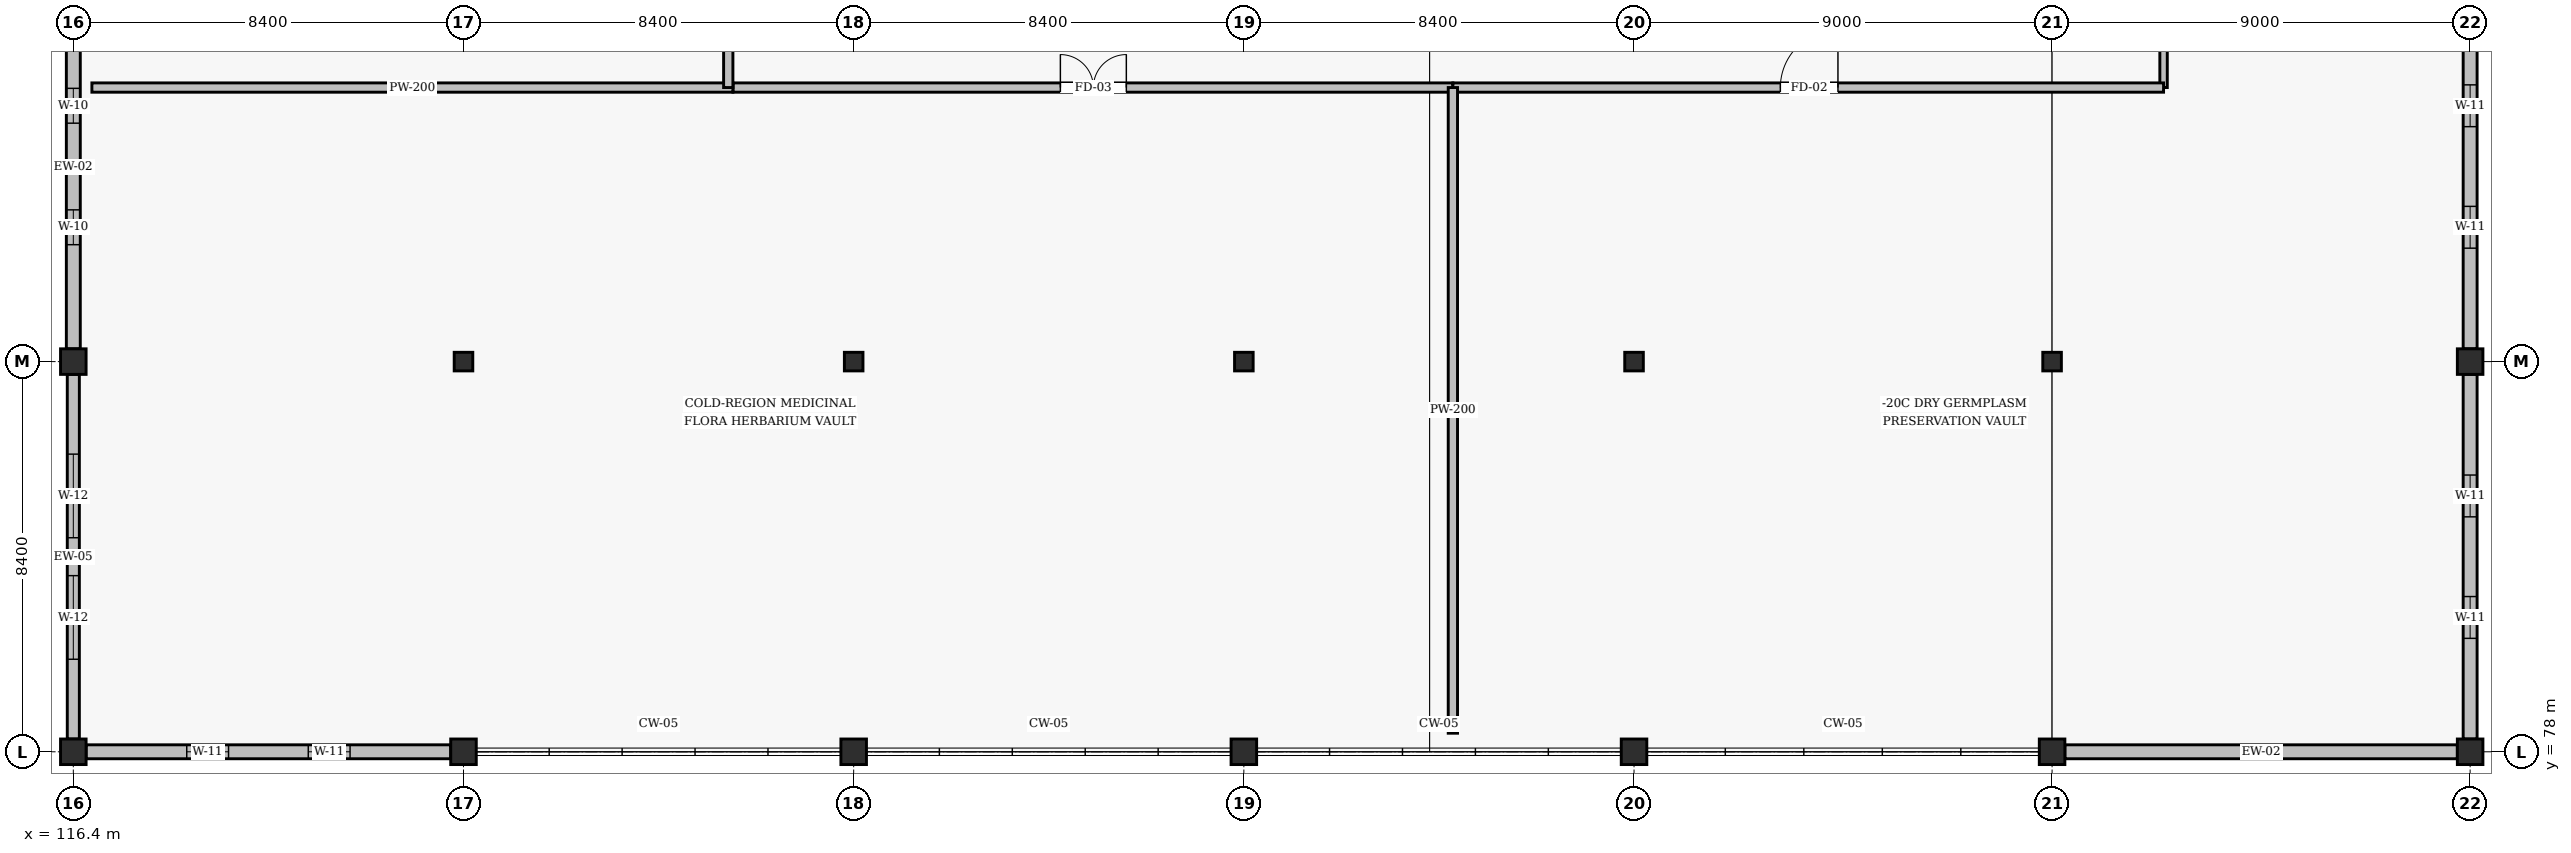
"""IFC4 building model, lengths in metres.
Left out: names, types, materials, properties, quantities, classifications, styles, units other than length and angle.
Written with IfcOpenShell. Run it as: python <this file> out.ifc"""

import sys

from ifc_helpers import new_model, si_unit, direction, frame, frame_2d, origin, origin_2d, place, context, subcontext, project, spatial, rectangle, hollow_rectangle, i_section, extrude, element, fill, save


model = new_model("IFC4")
c1 = context("Model", 3, precision=1e-05, world=origin(), true_north=direction((0.0, 1.0)))
c2 = subcontext(c1, "Body", "Model", "MODEL_VIEW")
j1 = project(units=[si_unit("LENGTHUNIT", "METRE"), si_unit("PLANEANGLEUNIT", "RADIAN")], contexts=[c1])
p1 = place(None, origin())
s1 = spatial("IfcSite", under=j1, at=p1, CompositionType="ELEMENT")
p2 = place(p1, origin())
s2 = spatial("IfcBuilding", under=s1, at=p2, CompositionType="ELEMENT")
p3 = place(p2, frame((0.0, 0.0, 17.1)))
s3 = spatial("IfcBuildingStorey", under=s2, at=p3, CompositionType="ELEMENT", Elevation=17.1)
for number, where, z_axis, x_axis in (
    (1, (116.4, 78.0, 0.0), (0.0, 0.0, 1.0), (1.0, 0.0, 0.0)),
    (2, (116.4, 86.4, 0.0), (0.0, 0.0, 1.0), (1.0, 0.0, 0.0)),
):
    element("IfcColumn", number, at=place(p3, frame(where, z_axis=z_axis, x_axis=x_axis)), inside=s3, PredefinedType="COLUMN", context=c2, shape_type="SweptSolid", body=[
        extrude(hollow_rectangle(XDim=0.55, YDim=0.55, WallThickness=0.022, InnerFilletRadius=0.022, OuterFilletRadius=0.044, at=origin_2d()), origin(), (0.0, 0.0, 1.0), 3.876),
    ])
p4 = place(p3, frame((124.8, 78.0, 0.0), z_axis=(0.0, 0.0, 1.0), x_axis=(1.0, 0.0, 0.0)))
e3 = element("IfcColumn", 3, at=p4, inside=s3, PredefinedType="COLUMN", context=c2, shape_type="SweptSolid", body=[
    extrude(hollow_rectangle(XDim=0.55, YDim=0.55, WallThickness=0.022, InnerFilletRadius=0.022, OuterFilletRadius=0.044, at=origin_2d()), origin(), (0.0, 0.0, 1.0), 3.9),
])
p5 = place(p3, frame((124.8, 86.4, 0.0), z_axis=(0.0, 0.0, 1.0), x_axis=(1.0, 0.0, 0.0)))
e4 = element("IfcColumn", 4, at=p5, inside=s3, PredefinedType="COLUMN", context=c2, shape_type="SweptSolid", body=[
    extrude(i_section(OverallWidth=0.4, OverallDepth=0.4, WebThickness=0.013, FlangeThickness=0.021, FilletRadius=0.022, at=origin_2d()), origin(), (0.0, 0.0, 1.0), 3.9),
])
p6 = place(p3, frame((133.2, 78.0, 0.0), z_axis=(0.0, 0.0, 1.0), x_axis=(1.0, 0.0, 0.0)))
e5 = element("IfcColumn", 5, at=p6, inside=s3, PredefinedType="COLUMN", context=c2, shape_type="SweptSolid", body=[
    extrude(hollow_rectangle(XDim=0.55, YDim=0.55, WallThickness=0.022, InnerFilletRadius=0.022, OuterFilletRadius=0.044, at=origin_2d()), origin(), (0.0, 0.0, 1.0), 3.9),
])
p7 = place(p3, frame((133.2, 86.4, 0.0), z_axis=(0.0, 0.0, 1.0), x_axis=(1.0, 0.0, 0.0)))
e6 = element("IfcColumn", 6, at=p7, inside=s3, PredefinedType="COLUMN", context=c2, shape_type="SweptSolid", body=[
    extrude(i_section(OverallWidth=0.4, OverallDepth=0.4, WebThickness=0.013, FlangeThickness=0.021, FilletRadius=0.022, at=origin_2d()), origin(), (0.0, 0.0, 1.0), 3.9),
])
p8 = place(p3, frame((141.6, 78.0, 0.0), z_axis=(0.0, 0.0, 1.0), x_axis=(1.0, 0.0, 0.0)))
e7 = element("IfcColumn", 7, at=p8, inside=s3, PredefinedType="COLUMN", context=c2, shape_type="SweptSolid", body=[
    extrude(hollow_rectangle(XDim=0.55, YDim=0.55, WallThickness=0.022, InnerFilletRadius=0.022, OuterFilletRadius=0.044, at=origin_2d()), origin(), (0.0, 0.0, 1.0), 3.9),
])
p9 = place(p3, frame((141.6, 86.4, 0.0), z_axis=(0.0, 0.0, 1.0), x_axis=(1.0, 0.0, 0.0)))
e8 = element("IfcColumn", 8, at=p9, inside=s3, PredefinedType="COLUMN", context=c2, shape_type="SweptSolid", body=[
    extrude(i_section(OverallWidth=0.4, OverallDepth=0.4, WebThickness=0.013, FlangeThickness=0.021, FilletRadius=0.022, at=origin_2d()), origin(), (0.0, 0.0, 1.0), 3.9),
])
p10 = place(p3, frame((150.0, 78.0, 0.0), z_axis=(0.0, 0.0, 1.0), x_axis=(1.0, 0.0, 0.0)))
e9 = element("IfcColumn", 9, at=p10, inside=s3, PredefinedType="COLUMN", context=c2, shape_type="SweptSolid", body=[
    extrude(hollow_rectangle(XDim=0.55, YDim=0.55, WallThickness=0.022, InnerFilletRadius=0.022, OuterFilletRadius=0.044, at=origin_2d()), origin(), (0.0, 0.0, 1.0), 3.9),
])
p11 = place(p3, frame((150.0, 86.4, 0.0), z_axis=(0.0, 0.0, 1.0), x_axis=(1.0, 0.0, 0.0)))
e10 = element("IfcColumn", 10, at=p11, inside=s3, PredefinedType="COLUMN", context=c2, shape_type="SweptSolid", body=[
    extrude(i_section(OverallWidth=0.4, OverallDepth=0.4, WebThickness=0.013, FlangeThickness=0.021, FilletRadius=0.022, at=origin_2d()), origin(), (0.0, 0.0, 1.0), 3.9),
])
p12 = place(p3, frame((159.0, 78.0, 0.0), z_axis=(0.0, 0.0, 1.0), x_axis=(1.0, 0.0, 0.0)))
e11 = element("IfcColumn", 11, at=p12, inside=s3, PredefinedType="COLUMN", context=c2, shape_type="SweptSolid", body=[
    extrude(hollow_rectangle(XDim=0.55, YDim=0.55, WallThickness=0.022, InnerFilletRadius=0.022, OuterFilletRadius=0.044, at=origin_2d()), origin(), (0.0, 0.0, 1.0), 3.9),
])
p13 = place(p3, frame((159.0, 86.4, 0.0), z_axis=(0.0, 0.0, 1.0), x_axis=(1.0, 0.0, 0.0)))
e12 = element("IfcColumn", 12, at=p13, inside=s3, PredefinedType="COLUMN", context=c2, shape_type="SweptSolid", body=[
    extrude(i_section(OverallWidth=0.4, OverallDepth=0.4, WebThickness=0.013, FlangeThickness=0.021, FilletRadius=0.022, at=origin_2d()), origin(), (0.0, 0.0, 1.0), 3.9),
])
for number, where, z_axis, x_axis in (
    (13, (168.0, 78.0, 0.0), (0.0, 0.0, 1.0), (1.0, 0.0, 0.0)),
    (14, (168.0, 86.4, 0.0), (0.0, 0.0, 1.0), (1.0, 0.0, 0.0)),
):
    element("IfcColumn", number, at=place(p3, frame(where, z_axis=z_axis, x_axis=x_axis)), inside=s3, PredefinedType="COLUMN", context=c2, shape_type="SweptSolid", body=[
        extrude(hollow_rectangle(XDim=0.55, YDim=0.55, WallThickness=0.022, InnerFilletRadius=0.022, OuterFilletRadius=0.044, at=origin_2d()), origin(), (0.0, 0.0, 1.0), 3.9),
    ])
p14 = place(p3, frame((168.0, 78.275, 0.0), z_axis=(0.0, 0.0, 1.0), x_axis=(0.0, 1.0, 0.0)))
e15 = element("IfcWall", 15, at=p14, inside=s3, PredefinedType="SOLIDWALL", context=c2, shape_type="SweptSolid", body=[
    extrude(rectangle(XDim=7.85, YDim=0.3, at=frame_2d((3.925, 0.0))), origin(), (0.0, 0.0, 1.0), 3.1),
])
p15 = place(p14, frame((2.167, 0.0, 1.1)))
e16 = element("IfcOpeningElement", 16, at=p15, cuts=e15, PredefinedType="OPENING", context=c2, shape_type="SweptSolid", body=[
    extrude(rectangle(XDim=0.9, YDim=1.5, at=frame_2d((0.45, 0.75))), frame((0.0, 0.16, 0.0), z_axis=(0.0, -1.0, 0.0), x_axis=(1.0, 0.0, 0.0)), (0.0, 0.0, 1.0), 0.32),
])
p16 = place(p14, frame((4.783, 0.0, 1.1)))
e17 = element("IfcOpeningElement", 17, at=p16, cuts=e15, PredefinedType="OPENING", context=c2, shape_type="SweptSolid", body=[
    extrude(rectangle(XDim=0.9, YDim=1.5, at=frame_2d((0.45, 0.75))), frame((0.0, 0.16, 0.0), z_axis=(0.0, -1.0, 0.0), x_axis=(1.0, 0.0, 0.0)), (0.0, 0.0, 1.0), 0.32),
])
p17 = place(p3, frame((168.0, 86.675, 0.0), z_axis=(0.0, 0.0, 1.0), x_axis=(0.0, 1.0, 0.0)))
e18 = element("IfcWall", 18, at=p17, inside=s3, PredefinedType="SOLIDWALL", context=c2, shape_type="SweptSolid", body=[
    extrude(rectangle(XDim=7.85, YDim=0.3, at=frame_2d((3.925, 0.0))), origin(), (0.0, 0.0, 1.0), 3.1),
])
p18 = place(p17, frame((2.167, 0.0, 1.1)))
e19 = element("IfcOpeningElement", 19, at=p18, cuts=e18, PredefinedType="OPENING", context=c2, shape_type="SweptSolid", body=[
    extrude(rectangle(XDim=0.9, YDim=1.5, at=frame_2d((0.45, 0.75))), frame((0.0, 0.16, 0.0), z_axis=(0.0, -1.0, 0.0), x_axis=(1.0, 0.0, 0.0)), (0.0, 0.0, 1.0), 0.32),
])
p19 = place(p17, frame((4.783, 0.0, 1.1)))
e20 = element("IfcOpeningElement", 20, at=p19, cuts=e18, PredefinedType="OPENING", context=c2, shape_type="SweptSolid", body=[
    extrude(rectangle(XDim=0.9, YDim=1.5, at=frame_2d((0.45, 0.75))), frame((0.0, 0.16, 0.0), z_axis=(0.0, -1.0, 0.0), x_axis=(1.0, 0.0, 0.0)), (0.0, 0.0, 1.0), 0.32),
])
p20 = place(p3, frame((116.4, 94.525, 0.0), z_axis=(0.0, 0.0, 1.0), x_axis=(0.0, -1.0, 0.0)))
e21 = element("IfcWall", 21, at=p20, inside=s3, PredefinedType="SOLIDWALL", context=c2, shape_type="SweptSolid", body=[
    extrude(rectangle(XDim=7.85, YDim=0.3, at=frame_2d((3.925, 0.0))), origin(), (0.0, 0.0, 1.0), 3.6),
])
p21 = place(p20, frame((2.242, 0.0, 1.05)))
e22 = element("IfcOpeningElement", 22, at=p21, cuts=e21, PredefinedType="OPENING", context=c2, shape_type="SweptSolid", body=[
    extrude(rectangle(XDim=0.75, YDim=1.6, at=frame_2d((0.375, 0.8))), frame((0.0, 0.16, 0.0), z_axis=(0.0, -1.0, 0.0), x_axis=(1.0, 0.0, 0.0)), (0.0, 0.0, 1.0), 0.32),
])
p22 = place(p20, frame((4.858, 0.0, 1.05)))
e23 = element("IfcOpeningElement", 23, at=p22, cuts=e21, PredefinedType="OPENING", context=c2, shape_type="SweptSolid", body=[
    extrude(rectangle(XDim=0.75, YDim=1.6, at=frame_2d((0.375, 0.8))), frame((0.0, 0.16, 0.0), z_axis=(0.0, -1.0, 0.0), x_axis=(1.0, 0.0, 0.0)), (0.0, 0.0, 1.0), 0.32),
])
p23 = place(p3, frame((116.4, 86.125, 0.0), z_axis=(0.0, 0.0, 1.0), x_axis=(0.0, -1.0, 0.0)))
e24 = element("IfcWall", 24, at=p23, inside=s3, PredefinedType="SOLIDWALL", context=c2, shape_type="SweptSolid", body=[
    extrude(rectangle(XDim=7.85, YDim=0.26, at=frame_2d((3.925, 0.0))), origin(), (0.0, 0.0, 1.0), 3.14),
])
p24 = place(p23, frame((1.717, 0.0, 0.75)))
e25 = element("IfcOpeningElement", 25, at=p24, cuts=e24, PredefinedType="OPENING", context=c2, shape_type="SweptSolid", body=[
    extrude(rectangle(XDim=1.8, YDim=2.09, at=frame_2d((0.9, 1.045))), frame((0.0, 0.14, 0.0), z_axis=(0.0, -1.0, 0.0), x_axis=(1.0, 0.0, 0.0)), (0.0, 0.0, 1.0), 0.28),
])
p25 = place(p23, frame((4.333, 0.0, 0.75)))
e26 = element("IfcOpeningElement", 26, at=p25, cuts=e24, PredefinedType="OPENING", context=c2, shape_type="SweptSolid", body=[
    extrude(rectangle(XDim=1.8, YDim=2.09, at=frame_2d((0.9, 1.045))), frame((0.0, 0.14, 0.0), z_axis=(0.0, -1.0, 0.0), x_axis=(1.0, 0.0, 0.0)), (0.0, 0.0, 1.0), 0.28),
])
p26 = place(p3, frame((116.675, 78.0, 0.0), z_axis=(0.0, 0.0, 1.0), x_axis=(1.0, 0.0, 0.0)))
e27 = element("IfcWall", 27, at=p26, inside=s3, PredefinedType="SOLIDWALL", context=c2, shape_type="SweptSolid", body=[
    extrude(rectangle(XDim=7.85, YDim=0.3, at=frame_2d((3.925, 0.0))), origin(), (0.0, 0.0, 1.0), 3.1),
])
p27 = place(p26, frame((2.167, 0.0, 1.1)))
e28 = element("IfcOpeningElement", 28, at=p27, cuts=e27, PredefinedType="OPENING", context=c2, shape_type="SweptSolid", body=[
    extrude(rectangle(XDim=0.9, YDim=1.5, at=frame_2d((0.45, 0.75))), frame((0.0, 0.16, 0.0), z_axis=(0.0, -1.0, 0.0), x_axis=(1.0, 0.0, 0.0)), (0.0, 0.0, 1.0), 0.32),
])
p28 = place(p26, frame((4.783, 0.0, 1.1)))
e29 = element("IfcOpeningElement", 29, at=p28, cuts=e27, PredefinedType="OPENING", context=c2, shape_type="SweptSolid", body=[
    extrude(rectangle(XDim=0.9, YDim=1.5, at=frame_2d((0.45, 0.75))), frame((0.0, 0.16, 0.0), z_axis=(0.0, -1.0, 0.0), x_axis=(1.0, 0.0, 0.0)), (0.0, 0.0, 1.0), 0.32),
])
p29 = place(p3, frame((159.275, 78.0, 0.0), z_axis=(0.0, 0.0, 1.0), x_axis=(1.0, 0.0, 0.0)))
e30 = element("IfcWall", 30, at=p29, inside=s3, PredefinedType="SOLIDWALL", context=c2, shape_type="SweptSolid", body=[
    extrude(rectangle(XDim=8.45, YDim=0.3, at=frame_2d((4.225, 0.0))), origin(), (0.0, 0.0, 1.0), 2.808),
])
p30 = place(p3, frame((161.4, 92.3, 0.0), z_axis=(0.0, 0.0, 1.0), x_axis=(0.0, 1.0, 0.0)))
e31 = element("IfcWall", 31, at=p30, inside=s3, PredefinedType="PARTITIONING", context=c2, shape_type="SweptSolid", body=[
    extrude(rectangle(XDim=14.1, YDim=0.16, at=frame_2d((7.05, 0.0))), origin(), (0.0, 0.0, 1.0), 2.95),
])
p31 = place(p30, frame((6.5, 0.0, 0.0)))
e32 = element("IfcOpeningElement", 32, at=p31, cuts=e31, PredefinedType="OPENING", context=c2, shape_type="SweptSolid", body=[
    extrude(rectangle(XDim=1.08, YDim=2.08, at=frame_2d((0.54, 1.04))), frame((0.0, 0.09, 0.0), z_axis=(0.0, -1.0, 0.0), x_axis=(1.0, 0.0, 0.0)), (0.0, 0.0, 1.0), 0.18),
])
p32 = place(p3, frame((130.6, 92.3, 0.0), z_axis=(0.0, 0.0, 1.0), x_axis=(1.0, 0.0, 0.0)))
e33 = element("IfcWall", 33, at=p32, inside=s3, PredefinedType="SOLIDWALL", context=c2, shape_type="SweptSolid", body=[
    extrude(rectangle(XDim=15.5, YDim=0.2, at=frame_2d((7.75, 0.0))), origin(), (0.0, 0.0, 1.0), 3.1),
])
p33 = place(p32, frame((7.05, 0.0, 0.0)))
e34 = element("IfcOpeningElement", 34, at=p33, cuts=e33, PredefinedType="OPENING", context=c2, shape_type="SweptSolid", body=[
    extrude(rectangle(XDim=1.42, YDim=2.18, at=frame_2d((0.71, 1.09))), frame((0.0, 0.11, 0.0), z_axis=(0.0, -1.0, 0.0), x_axis=(1.0, 0.0, 0.0)), (0.0, 0.0, 1.0), 0.22),
])
p34 = place(p3, frame((146.1, 92.3, 0.0), z_axis=(0.0, 0.0, 1.0), x_axis=(1.0, 0.0, 0.0)))
e35 = element("IfcWall", 35, at=p34, inside=s3, PredefinedType="SOLIDWALL", context=c2, shape_type="SweptSolid", body=[
    extrude(rectangle(XDim=15.3, YDim=0.2, at=frame_2d((7.65, 0.0))), origin(), (0.0, 0.0, 1.0), 3.1),
])
p35 = place(p34, frame((7.05, 0.0, 0.0)))
e36 = element("IfcOpeningElement", 36, at=p35, cuts=e35, PredefinedType="OPENING", context=c2, shape_type="SweptSolid", body=[
    extrude(rectangle(XDim=1.24, YDim=2.15, at=frame_2d((0.62, 1.075))), frame((0.0, 0.11, 0.0), z_axis=(0.0, -1.0, 0.0), x_axis=(1.0, 0.0, 0.0)), (0.0, 0.0, 1.0), 0.22),
])
p36 = place(p3, frame((146.1, 78.4, 0.0), z_axis=(0.0, 0.0, 1.0), x_axis=(0.0, 1.0, 0.0)))
e37 = element("IfcWall", 37, at=p36, inside=s3, PredefinedType="SOLIDWALL", context=c2, shape_type="SweptSolid", body=[
    extrude(rectangle(XDim=13.9, YDim=0.2, at=frame_2d((6.95, 0.0))), origin(), (0.0, 0.0, 1.0), 3.1),
])
p37 = place(p3, frame((116.8, 92.3, 0.0), z_axis=(0.0, 0.0, 1.0), x_axis=(1.0, 0.0, 0.0)))
e38 = element("IfcWall", 38, at=p37, inside=s3, PredefinedType="SOLIDWALL", context=c2, shape_type="SweptSolid", body=[
    extrude(rectangle(XDim=13.8, YDim=0.2, at=frame_2d((6.9, 0.0))), origin(), (0.0, 0.0, 1.0), 3.1),
])
p38 = place(p3, frame((130.5, 92.3, 0.0), z_axis=(0.0, 0.0, 1.0), x_axis=(0.0, 1.0, 0.0)))
e39 = element("IfcWall", 39, at=p38, inside=s3, PredefinedType="SOLIDWALL", context=c2, shape_type="SweptSolid", body=[
    extrude(rectangle(XDim=14.2, YDim=0.2, at=frame_2d((7.1, 0.0))), origin(), (0.0, 0.0, 1.0), 3.1),
])
p39 = place(p38, frame((6.5, 0.0, 0.0)))
e40 = element("IfcOpeningElement", 40, at=p39, cuts=e39, PredefinedType="OPENING", context=c2, shape_type="SweptSolid", body=[
    extrude(rectangle(XDim=1.18, YDim=2.15, at=frame_2d((0.59, 1.075))), frame((0.0, 0.11, 0.0), z_axis=(0.0, -1.0, 0.0), x_axis=(1.0, 0.0, 0.0)), (0.0, 0.0, 1.0), 0.22),
])
p40 = place(p15, origin())
e41 = element("IfcWindow", 41, at=p40, inside=s3, PartitioningType="SINGLE_PANEL", PredefinedType="WINDOW", context=c2, shape_type="SweptSolid", body=[
    extrude(rectangle(XDim=0.9, YDim=1.5, at=frame_2d((0.45, 0.75))), frame((0.0, 0.03, 0.0), z_axis=(0.0, -1.0, 0.0), x_axis=(1.0, 0.0, 0.0)), (0.0, 0.0, 1.0), 0.06),
])
fill(e16, e41)
p41 = place(p16, origin())
e42 = element("IfcWindow", 42, at=p41, inside=s3, PartitioningType="SINGLE_PANEL", PredefinedType="WINDOW", context=c2, shape_type="SweptSolid", body=[
    extrude(rectangle(XDim=0.9, YDim=1.5, at=frame_2d((0.45, 0.75))), frame((0.0, 0.03, 0.0), z_axis=(0.0, -1.0, 0.0), x_axis=(1.0, 0.0, 0.0)), (0.0, 0.0, 1.0), 0.06),
])
fill(e17, e42)
p42 = place(p18, origin())
e43 = element("IfcWindow", 43, at=p42, inside=s3, PartitioningType="SINGLE_PANEL", PredefinedType="WINDOW", context=c2, shape_type="SweptSolid", body=[
    extrude(rectangle(XDim=0.9, YDim=1.5, at=frame_2d((0.45, 0.75))), frame((0.0, 0.03, 0.0), z_axis=(0.0, -1.0, 0.0), x_axis=(1.0, 0.0, 0.0)), (0.0, 0.0, 1.0), 0.06),
])
fill(e19, e43)
p43 = place(p19, origin())
e44 = element("IfcWindow", 44, at=p43, inside=s3, PartitioningType="SINGLE_PANEL", PredefinedType="WINDOW", context=c2, shape_type="SweptSolid", body=[
    extrude(rectangle(XDim=0.9, YDim=1.5, at=frame_2d((0.45, 0.75))), frame((0.0, 0.03, 0.0), z_axis=(0.0, -1.0, 0.0), x_axis=(1.0, 0.0, 0.0)), (0.0, 0.0, 1.0), 0.06),
])
fill(e20, e44)
p44 = place(p21, origin())
e45 = element("IfcWindow", 45, at=p44, inside=s3, PartitioningType="SINGLE_PANEL", PredefinedType="WINDOW", context=c2, shape_type="SweptSolid", body=[
    extrude(rectangle(XDim=0.75, YDim=1.6, at=frame_2d((0.375, 0.8))), frame((0.0, 0.03, 0.0), z_axis=(0.0, -1.0, 0.0), x_axis=(1.0, 0.0, 0.0)), (0.0, 0.0, 1.0), 0.06),
])
fill(e22, e45)
p45 = place(p22, origin())
e46 = element("IfcWindow", 46, at=p45, inside=s3, PartitioningType="SINGLE_PANEL", PredefinedType="WINDOW", context=c2, shape_type="SweptSolid", body=[
    extrude(rectangle(XDim=0.75, YDim=1.6, at=frame_2d((0.375, 0.8))), frame((0.0, 0.03, 0.0), z_axis=(0.0, -1.0, 0.0), x_axis=(1.0, 0.0, 0.0)), (0.0, 0.0, 1.0), 0.06),
])
fill(e23, e46)
p46 = place(p24, origin())
e47 = element("IfcWindow", 47, at=p46, inside=s3, PartitioningType="SINGLE_PANEL", PredefinedType="WINDOW", context=c2, shape_type="SweptSolid", body=[
    extrude(rectangle(XDim=1.8, YDim=2.09, at=frame_2d((0.9, 1.045))), frame((0.0, 0.03, 0.0), z_axis=(0.0, -1.0, 0.0), x_axis=(1.0, 0.0, 0.0)), (0.0, 0.0, 1.0), 0.06),
])
fill(e25, e47)
p47 = place(p25, origin())
e48 = element("IfcWindow", 48, at=p47, inside=s3, PartitioningType="SINGLE_PANEL", PredefinedType="WINDOW", context=c2, shape_type="SweptSolid", body=[
    extrude(rectangle(XDim=1.8, YDim=2.09, at=frame_2d((0.9, 1.045))), frame((0.0, 0.03, 0.0), z_axis=(0.0, -1.0, 0.0), x_axis=(1.0, 0.0, 0.0)), (0.0, 0.0, 1.0), 0.06),
])
fill(e26, e48)
p48 = place(p27, origin())
e49 = element("IfcWindow", 49, at=p48, inside=s3, PartitioningType="SINGLE_PANEL", PredefinedType="WINDOW", context=c2, shape_type="SweptSolid", body=[
    extrude(rectangle(XDim=0.9, YDim=1.5, at=frame_2d((0.45, 0.75))), frame((0.0, 0.03, 0.0), z_axis=(0.0, -1.0, 0.0), x_axis=(1.0, 0.0, 0.0)), (0.0, 0.0, 1.0), 0.06),
])
fill(e28, e49)
p49 = place(p28, origin())
e50 = element("IfcWindow", 50, at=p49, inside=s3, PartitioningType="SINGLE_PANEL", PredefinedType="WINDOW", context=c2, shape_type="SweptSolid", body=[
    extrude(rectangle(XDim=0.9, YDim=1.5, at=frame_2d((0.45, 0.75))), frame((0.0, 0.03, 0.0), z_axis=(0.0, -1.0, 0.0), x_axis=(1.0, 0.0, 0.0)), (0.0, 0.0, 1.0), 0.06),
])
fill(e29, e50)
p50 = place(p33, origin())
e51 = element("IfcDoor", 51, at=p50, inside=s3, OperationType="DOUBLE_DOOR_SINGLE_SWING", PredefinedType="DOOR", context=c2, shape_type="SweptSolid", body=[
    extrude(rectangle(XDim=1.42, YDim=2.18, at=frame_2d((0.71, 1.09))), frame((0.0, 0.025, 0.0), z_axis=(0.0, -1.0, 0.0), x_axis=(1.0, 0.0, 0.0)), (0.0, 0.0, 1.0), 0.05),
])
fill(e34, e51)
p51 = place(p35, origin())
e52 = element("IfcDoor", 52, at=p51, inside=s3, OperationType="SINGLE_SWING_RIGHT", PredefinedType="DOOR", context=c2, shape_type="SweptSolid", body=[
    extrude(rectangle(XDim=1.24, YDim=2.15, at=frame_2d((0.62, 1.075))), frame((0.0, 0.025, 0.0), z_axis=(0.0, -1.0, 0.0), x_axis=(1.0, 0.0, 0.0)), (0.0, 0.0, 1.0), 0.05),
])
fill(e36, e52)
save(model, sys.argv[1])
